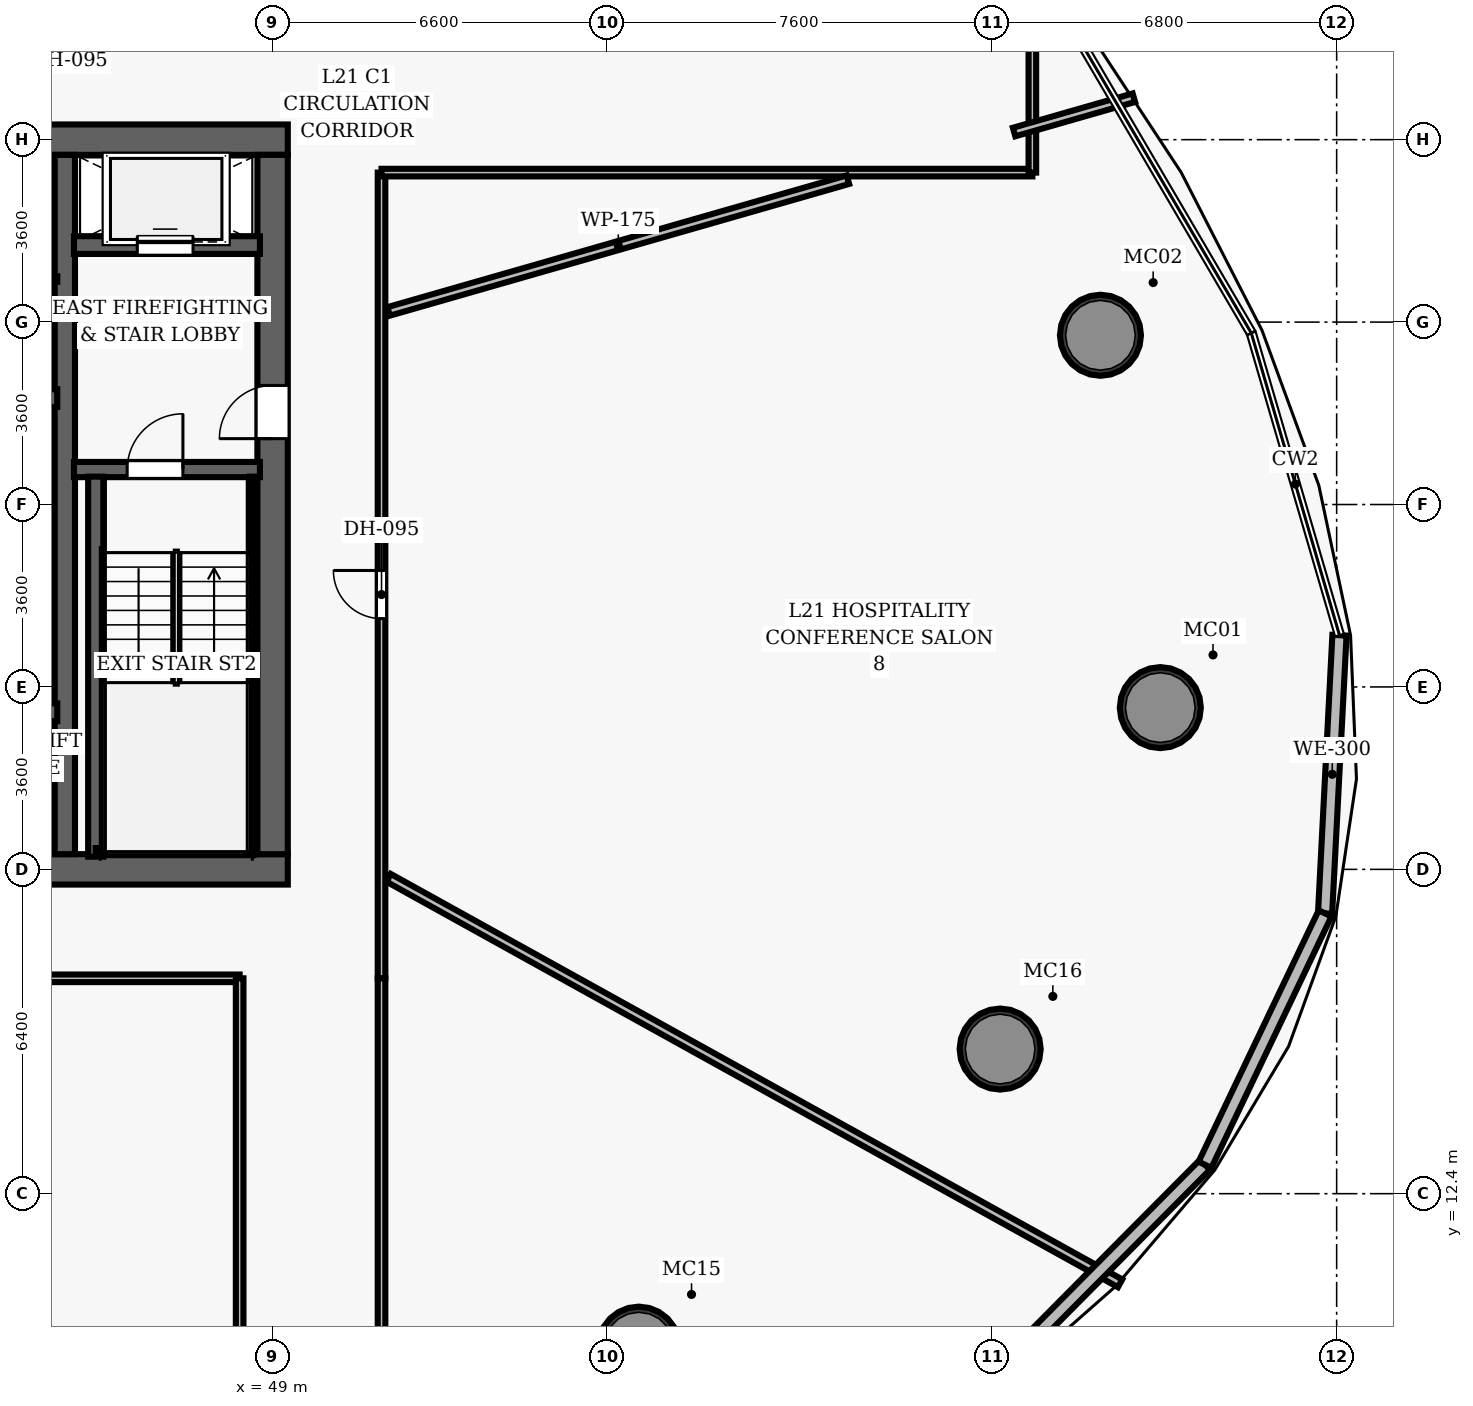
"""IFC4 building model, lengths in metres.
Left out: names, types, materials, properties, quantities, classifications, styles, units other than length and angle.
Written with IfcOpenShell. Run it as: python <this file> out.ifc"""

import sys

from ifc_helpers import new_model, si_unit, direction, frame, frame_2d, origin, origin_2d, place, context, subcontext, project, spatial, rectangle, hollow_circle, extrude, element, fill, save


model = new_model("IFC4")
c1 = context("Model", 3, precision=1e-05, world=origin(), true_north=direction((0.0, 1.0)))
c2 = subcontext(c1, "Body", "Model", "MODEL_VIEW")
j1 = project(units=[si_unit("LENGTHUNIT", "METRE"), si_unit("PLANEANGLEUNIT", "RADIAN")], contexts=[c1])
p1 = place(None, origin())
s1 = spatial("IfcSite", under=j1, at=p1, CompositionType="ELEMENT")
p2 = place(p1, origin())
s2 = spatial("IfcBuilding", under=s1, at=p2, CompositionType="ELEMENT")
p3 = place(p2, frame((0.0, 0.0, 90.4)))
s3 = spatial("IfcBuildingStorey", under=s2, at=p3, CompositionType="ELEMENT", Elevation=90.4)
p4 = place(p3, frame((26.7, 18.8, 0.0), z_axis=(0.0, 0.0, 1.0), x_axis=(1.0, 0.0, 0.0)))
e1 = element("IfcWall", 1, at=p4, inside=s3, PredefinedType="SHEAR", context=c2, shape_type="SweptSolid", body=[
    extrude(rectangle(XDim=22.6, YDim=0.6, at=frame_2d((11.3, 0.0))), origin(), (0.0, 0.0, 1.0), 3.5),
])
p5 = place(p4, frame((14.52, 0.0, 0.0)))
e2 = element("IfcOpeningElement", 2, at=p5, cuts=e1, PredefinedType="OPENING", context=c2, shape_type="SweptSolid", body=[
    extrude(rectangle(XDim=1.05, YDim=2.15, at=frame_2d((0.525, 1.075))), frame((0.0, 0.31, 0.0), z_axis=(0.0, -1.0, 0.0), x_axis=(1.0, 0.0, 0.0)), (0.0, 0.0, 1.0), 0.62),
])
p6 = place(p3, frame((26.7, 33.2, 0.0), z_axis=(0.0, 0.0, 1.0), x_axis=(1.0, 0.0, 0.0)))
e3 = element("IfcWall", 3, at=p6, inside=s3, PredefinedType="SHEAR", context=c2, shape_type="SweptSolid", body=[
    extrude(rectangle(XDim=22.6, YDim=0.6, at=frame_2d((11.3, 0.0))), origin(), (0.0, 0.0, 1.0), 3.5),
])
p7 = place(p6, frame((4.62, 0.0, 0.0)))
e4 = element("IfcOpeningElement", 4, at=p7, cuts=e3, PredefinedType="OPENING", context=c2, shape_type="SweptSolid", body=[
    extrude(rectangle(XDim=1.05, YDim=2.15, at=frame_2d((0.525, 1.075))), frame((0.0, 0.31, 0.0), z_axis=(0.0, -1.0, 0.0), x_axis=(1.0, 0.0, 0.0)), (0.0, 0.0, 1.0), 0.62),
])
p8 = place(p6, frame((14.52, 0.0, 0.0)))
e5 = element("IfcOpeningElement", 5, at=p8, cuts=e3, PredefinedType="OPENING", context=c2, shape_type="SweptSolid", body=[
    extrude(rectangle(XDim=1.05, YDim=2.15, at=frame_2d((0.525, 1.075))), frame((0.0, 0.31, 0.0), z_axis=(0.0, -1.0, 0.0), x_axis=(1.0, 0.0, 0.0)), (0.0, 0.0, 1.0), 0.62),
])
p9 = place(p3, frame((49.0, 19.1, 0.0), z_axis=(0.0, 0.0, 1.0), x_axis=(0.0, 1.0, 0.0)))
e6 = element("IfcWall", 6, at=p9, inside=s3, PredefinedType="SHEAR", context=c2, shape_type="SweptSolid", body=[
    extrude(rectangle(XDim=13.8, YDim=0.6, at=frame_2d((6.9, 0.0))), origin(), (0.0, 0.0, 1.0), 3.5),
])
p10 = place(p9, frame((8.2, 0.0, 0.0)))
e7 = element("IfcOpeningElement", 7, at=p10, cuts=e6, PredefinedType="OPENING", context=c2, shape_type="SweptSolid", body=[
    extrude(rectangle(XDim=1.05, YDim=2.15, at=frame_2d((0.525, 1.075))), frame((0.0, 0.31, 0.0), z_axis=(0.0, -1.0, 0.0), x_axis=(1.0, 0.0, 0.0)), (0.0, 0.0, 1.0), 0.62),
])
p11 = place(p3, frame((44.9, 19.1, 0.0), z_axis=(0.0, 0.0, 1.0), x_axis=(0.0, 1.0, 0.0)))
e8 = element("IfcWall", 8, at=p11, inside=s3, PredefinedType="SHEAR", context=c2, shape_type="SweptSolid", body=[
    extrude(rectangle(XDim=13.8, YDim=0.4, at=frame_2d((6.9, 0.0))), origin(), (0.0, 0.0, 1.0), 3.5),
])
for number, where, z_axis, x_axis in (
    (9, (66.52, 21.992, 0.0), (0.0, 0.0, 1.0), (1.0, 0.0, 0.0)),
    (10, (65.339, 29.34, 0.0), (0.0, 0.0, 1.0), (1.0, 0.0, 0.0)),
    (11, (56.228, 9.371, 0.0), (0.0, 0.0, 1.0), (1.0, 0.0, 0.0)),
    (12, (63.359, 15.254, 0.0), (0.0, 0.0, 1.0), (1.0, 0.0, 0.0)),
):
    element("IfcColumn", number, at=place(p3, frame(where, z_axis=z_axis, x_axis=x_axis)), inside=s3, PredefinedType="COLUMN", context=c2, shape_type="SweptSolid", body=[
        extrude(hollow_circle(Radius=0.8, WallThickness=0.06, at=origin_2d()), origin(), (0.0, 0.0, 1.0), 3.5),
    ])
p12 = place(p3, frame((45.08, 26.69, 0.0), z_axis=(0.0, 0.0, 1.0), x_axis=(1.0, 0.0, 0.0)))
e13 = element("IfcWall", 13, at=p12, inside=s3, PredefinedType="SHEAR", context=c2, shape_type="SweptSolid", body=[
    extrude(rectangle(XDim=3.67, YDim=0.3, at=frame_2d((1.835, 0.0))), origin(), (0.0, 0.0, 1.0), 3.5),
])
p13 = place(p12, frame((1.05, 0.0, 0.0)))
e14 = element("IfcOpeningElement", 14, at=p13, cuts=e13, PredefinedType="OPENING", context=c2, shape_type="SweptSolid", body=[
    extrude(rectangle(XDim=1.1, YDim=2.15, at=frame_2d((0.55, 1.075))), frame((0.0, 0.16, 0.0), z_axis=(0.0, -1.0, 0.0), x_axis=(1.0, 0.0, 0.0)), (0.0, 0.0, 1.0), 0.32),
])
p14 = place(p3, frame((45.51, 19.05, 0.0), z_axis=(0.0, 0.0, 1.0), x_axis=(0.0, 1.0, 0.0)))
e15 = element("IfcWall", 15, at=p14, inside=s3, PredefinedType="SHEAR", context=c2, shape_type="SweptSolid", body=[
    extrude(rectangle(XDim=7.5, YDim=0.3, at=frame_2d((3.75, 0.0))), origin(), (0.0, 0.0, 1.0), 3.5),
])
p15 = place(p3, frame((48.605, 19.1, 0.0), z_axis=(0.0, 0.0, 1.0), x_axis=(0.0, 1.0, 0.0)))
e16 = element("IfcWall", 16, at=p15, inside=s3, PredefinedType="SHEAR", context=c2, shape_type="SweptSolid", body=[
    extrude(rectangle(XDim=7.45, YDim=0.12, at=frame_2d((3.725, 0.0))), origin(), (0.0, 0.0, 1.0), 3.5),
])
p16 = place(p3, frame((45.51, 19.16, 0.0), z_axis=(0.0, 0.0, 1.0), x_axis=(1.0, 0.0, 0.0)))
e17 = element("IfcWall", 17, at=p16, inside=s3, PredefinedType="SHEAR", context=c2, shape_type="SweptSolid", body=[
    extrude(rectangle(XDim=3.095, YDim=0.12, at=frame_2d((1.547, 0.0))), origin(), (0.0, 0.0, 1.0), 3.5),
])
p17 = place(p3, frame((45.08, 31.12, 0.0), z_axis=(0.0, 0.0, 1.0), x_axis=(1.0, 0.0, 0.0)))
e18 = element("IfcWall", 18, at=p17, inside=s3, PredefinedType="SHEAR", context=c2, shape_type="SweptSolid", body=[
    extrude(rectangle(XDim=3.67, YDim=0.35, at=frame_2d((1.835, 0.0))), origin(), (0.0, 0.0, 1.0), 2.6),
])
p18 = place(p17, frame((1.25, 0.0, 0.0)))
e19 = element("IfcOpeningElement", 19, at=p18, cuts=e18, PredefinedType="OPENING", context=c2, shape_type="SweptSolid", body=[
    extrude(rectangle(XDim=1.1, YDim=2.15, at=frame_2d((0.55, 1.075))), frame((0.0, 0.185, 0.0), z_axis=(0.0, -1.0, 0.0), x_axis=(1.0, 0.0, 0.0)), (0.0, 0.0, 1.0), 0.37),
])
for number, where, z_axis, x_axis in (
    (20, (42.72, 21.9, 0.0), (0.0, 0.0, 1.0), (1.0, 0.0, 0.0)),
    (21, (42.72, 28.1, 0.0), (0.0, 0.0, 1.0), (1.0, 0.0, 0.0)),
):
    element("IfcWall", number, at=place(p3, frame(where, z_axis=z_axis, x_axis=x_axis)), inside=s3, PredefinedType="SHEAR", context=c2, shape_type="SweptSolid", body=[
        extrude(rectangle(XDim=2.03, YDim=0.35, at=frame_2d((1.015, 0.0))), origin(), (0.0, 0.0, 1.0), 2.6),
    ])
p19 = place(p3, frame((42.55, 30.45, 0.0), z_axis=(0.0, 0.0, 1.0), x_axis=(1.0, 0.0, 0.0)))
e22 = element("IfcWall", 22, at=p19, inside=s3, PredefinedType="PARTITIONING", context=c2, shape_type="SweptSolid", body=[
    extrude(rectangle(XDim=2.2, YDim=0.11, at=frame_2d((1.1, 0.0))), origin(), (0.0, 0.0, 1.0), 2.6),
])
p20 = place(p3, frame((24.85, 16.65, 0.0), z_axis=(0.0, 0.0, 1.0), x_axis=(1.0, 0.0, 0.0)))
e23 = element("IfcWall", 23, at=p20, inside=s3, PredefinedType="PARTITIONING", context=c2, shape_type="SweptSolid", body=[
    extrude(rectangle(XDim=23.5, YDim=0.15, at=frame_2d((11.75, 0.0))), origin(), (0.0, 0.0, 1.0), 2.6),
])
p21 = place(p20, frame((5.673, 0.0, 0.0)))
e24 = element("IfcOpeningElement", 24, at=p21, cuts=e23, PredefinedType="OPENING", context=c2, shape_type="SweptSolid", body=[
    extrude(rectangle(XDim=0.95, YDim=2.15, at=frame_2d((0.475, 1.075))), frame((0.0, 0.085, 0.0), z_axis=(0.0, -1.0, 0.0), x_axis=(1.0, 0.0, 0.0)), (0.0, 0.0, 1.0), 0.17),
])
p22 = place(p20, frame((13.547, 0.0, 0.0)))
e25 = element("IfcOpeningElement", 25, at=p22, cuts=e23, PredefinedType="OPENING", context=c2, shape_type="SweptSolid", body=[
    extrude(rectangle(XDim=0.95, YDim=2.15, at=frame_2d((0.475, 1.075))), frame((0.0, 0.085, 0.0), z_axis=(0.0, -1.0, 0.0), x_axis=(1.0, 0.0, 0.0)), (0.0, 0.0, 1.0), 0.17),
])
p23 = place(p20, frame((17.077, 0.0, 0.0)))
e26 = element("IfcOpeningElement", 26, at=p23, cuts=e23, PredefinedType="OPENING", context=c2, shape_type="SweptSolid", body=[
    extrude(rectangle(XDim=0.95, YDim=2.15, at=frame_2d((0.475, 1.075))), frame((0.0, 0.085, 0.0), z_axis=(0.0, -1.0, 0.0), x_axis=(1.0, 0.0, 0.0)), (0.0, 0.0, 1.0), 0.17),
])
p24 = place(p3, frame((51.15, 16.65, 0.0), z_axis=(0.0, 0.0, 1.0), x_axis=(0.0, 1.0, 0.0)))
e27 = element("IfcWall", 27, at=p24, inside=s3, PredefinedType="PARTITIONING", context=c2, shape_type="SweptSolid", body=[
    extrude(rectangle(XDim=15.9, YDim=0.15, at=frame_2d((7.95, 0.0))), origin(), (0.0, 0.0, 1.0), 2.6),
])
p25 = place(p24, frame((7.098, 0.0, 0.0)))
e28 = element("IfcOpeningElement", 28, at=p25, cuts=e27, PredefinedType="OPENING", context=c2, shape_type="SweptSolid", body=[
    extrude(rectangle(XDim=0.95, YDim=2.15, at=frame_2d((0.475, 1.075))), frame((0.0, 0.085, 0.0), z_axis=(0.0, -1.0, 0.0), x_axis=(1.0, 0.0, 0.0)), (0.0, 0.0, 1.0), 0.17),
])
p26 = place(p3, frame((51.15, 32.55, 0.0), z_axis=(0.0, 0.0, 1.0), x_axis=(1.0, 0.0, 0.0)))
e29 = element("IfcWall", 29, at=p26, inside=s3, PredefinedType="PARTITIONING", context=c2, shape_type="SweptSolid", body=[
    extrude(rectangle(XDim=12.845, YDim=0.15, at=frame_2d((6.422, 0.0))), origin(), (0.0, 0.0, 1.0), 2.6),
])
p27 = place(p3, frame((63.995, 32.55, 0.0), z_axis=(0.0, 0.0, 1.0), x_axis=(0.0, 1.0, 0.0)))
e30 = element("IfcWall", 30, at=p27, inside=s3, PredefinedType="PARTITIONING", context=c2, shape_type="SweptSolid", body=[
    extrude(rectangle(XDim=2.8, YDim=0.15, at=frame_2d((1.4, 0.0))), origin(), (0.0, 0.0, 1.0), 2.6),
])
for number, where, z_axis, x_axis in (
    (31, (48.35, 6.5, 0.0), (0.0, 0.0, 1.0), (0.0, 1.0, 0.0)),
    (32, (51.15, 6.5, 0.0), (0.0, 0.0, 1.0), (0.0, 1.0, 0.0)),
):
    element("IfcWall", number, at=place(p3, frame(where, z_axis=z_axis, x_axis=x_axis)), inside=s3, PredefinedType="PARTITIONING", context=c2, shape_type="SweptSolid", body=[
        extrude(rectangle(XDim=10.15, YDim=0.15, at=frame_2d((5.075, 0.0))), origin(), (0.0, 0.0, 1.0), 2.6),
    ])
p28 = place(p3, frame((51.29, 29.811, 0.0), z_axis=(0.0, 0.0, 1.0), x_axis=(0.961261668066, 0.275637453019, 0.0)))
e33 = element("IfcWall", 33, at=p28, inside=s3, PredefinedType="PARTITIONING", context=c2, shape_type="SweptSolid", body=[
    extrude(rectangle(XDim=9.429, YDim=0.175, at=frame_2d((4.715, 0.0))), origin(), (0.0, 0.0, 1.0), 2.6),
])
p29 = place(p3, frame((63.634, 33.351, 0.0), z_axis=(0.0, 0.0, 1.0), x_axis=(0.961261224471, 0.275639000014, 0.0)))
e34 = element("IfcWall", 34, at=p29, inside=s3, PredefinedType="PARTITIONING", context=c2, shape_type="SweptSolid", body=[
    extrude(rectangle(XDim=2.459, YDim=0.175, at=frame_2d((1.229, 0.0))), origin(), (0.0, 0.0, 1.0), 2.6),
])
p30 = place(p3, frame((40.721, 16.51, 0.0), z_axis=(0.0, 0.0, 1.0), x_axis=(0.275634013996, -0.961262654184, 0.0)))
e35 = element("IfcWall", 35, at=p30, inside=s3, PredefinedType="PARTITIONING", context=c2, shape_type="SweptSolid", body=[
    extrude(rectangle(XDim=15.857, YDim=0.175, at=frame_2d((7.929, 0.0))), origin(), (0.0, 0.0, 1.0), 2.6),
])
p31 = place(p3, frame((51.29, 18.633, 0.0), z_axis=(0.0, 0.0, 1.0), x_axis=(0.874615280468, -0.484817606087, 0.0)))
e36 = element("IfcWall", 36, at=p31, inside=s3, PredefinedType="PARTITIONING", context=c2, shape_type="SweptSolid", body=[
    extrude(rectangle(XDim=16.506, YDim=0.175, at=frame_2d((8.253, 0.0))), origin(), (0.0, 0.0, 1.0), 2.6),
])
p32 = place(p3, frame((70.055, 23.421, 0.0), z_axis=(0.0, 0.0, 1.0), x_axis=(-0.051649739807, -0.998665261425, 0.0)))
e37 = element("IfcWall", 37, at=p32, inside=s3, PredefinedType="SOLIDWALL", context=c2, shape_type="SweptSolid", body=[
    extrude(rectangle(XDim=5.497, YDim=0.28, at=frame_2d((2.749, 0.0))), origin(), (0.0, 0.0, 1.0), 3.25),
])
p33 = place(p3, frame((67.401, 12.971, 0.0), z_axis=(0.0, 0.0, 1.0), x_axis=(-0.704291107344, -0.709911287497, 0.0)))
e38 = element("IfcWall", 38, at=p33, inside=s3, PredefinedType="SOLIDWALL", context=c2, shape_type="SweptSolid", body=[
    extrude(rectangle(XDim=6.212, YDim=0.28, at=frame_2d((3.106, 0.0))), origin(), (0.0, 0.0, 1.0), 3.25),
])
p34 = place(p3, frame((69.771, 17.931, 0.0), z_axis=(0.0, 0.0, 1.0), x_axis=(-0.431119191354, -0.902294986602, 0.0)))
e39 = element("IfcWall", 39, at=p34, inside=s3, PredefinedType="SOLIDWALL", context=c2, shape_type="SweptSolid", body=[
    extrude(rectangle(XDim=5.498, YDim=0.28, at=frame_2d((2.749, 0.0))), origin(), (0.0, 0.0, 1.0), 3.25),
])
p35 = place(p13, origin())
e40 = element("IfcDoor", 40, at=p35, inside=s3, OperationType="SINGLE_SWING_RIGHT", PredefinedType="DOOR", context=c2, shape_type="SweptSolid", body=[
    extrude(rectangle(XDim=1.1, YDim=2.15, at=frame_2d((0.55, 1.075))), frame((0.0, 0.025, 0.0), z_axis=(0.0, -1.0, 0.0), x_axis=(1.0, 0.0, 0.0)), (0.0, 0.0, 1.0), 0.05),
])
fill(e14, e40)
p36 = place(p10, origin())
e41 = element("IfcDoor", 41, at=p36, inside=s3, OperationType="SINGLE_SWING_LEFT", PredefinedType="DOOR", context=c2, shape_type="SweptSolid", body=[
    extrude(rectangle(XDim=1.05, YDim=2.15, at=frame_2d((0.525, 1.075))), frame((0.0, 0.025, 0.0), z_axis=(0.0, -1.0, 0.0), x_axis=(1.0, 0.0, 0.0)), (0.0, 0.0, 1.0), 0.05),
])
fill(e7, e41)
p37 = place(p25, origin())
e42 = element("IfcDoor", 42, at=p37, inside=s3, OperationType="SINGLE_SWING_RIGHT", PredefinedType="DOOR", context=c2, shape_type="SweptSolid", body=[
    extrude(rectangle(XDim=0.95, YDim=2.15, at=frame_2d((0.475, 1.075))), frame((0.0, 0.025, 0.0), z_axis=(0.0, -1.0, 0.0), x_axis=(1.0, 0.0, 0.0)), (0.0, 0.0, 1.0), 0.05),
])
fill(e28, e42)
p38 = place(p18, origin())
e43 = element("IfcDoor", 43, at=p38, inside=s3, OperationType="SLIDING_TO_LEFT", PredefinedType="DOOR", context=c2, shape_type="SweptSolid", body=[
    extrude(rectangle(XDim=1.1, YDim=2.15, at=frame_2d((0.55, 1.075))), frame((0.0, 0.025, 0.0), z_axis=(0.0, -1.0, 0.0), x_axis=(1.0, 0.0, 0.0)), (0.0, 0.0, 1.0), 0.05),
])
fill(e19, e43)
save(model, sys.argv[1])
